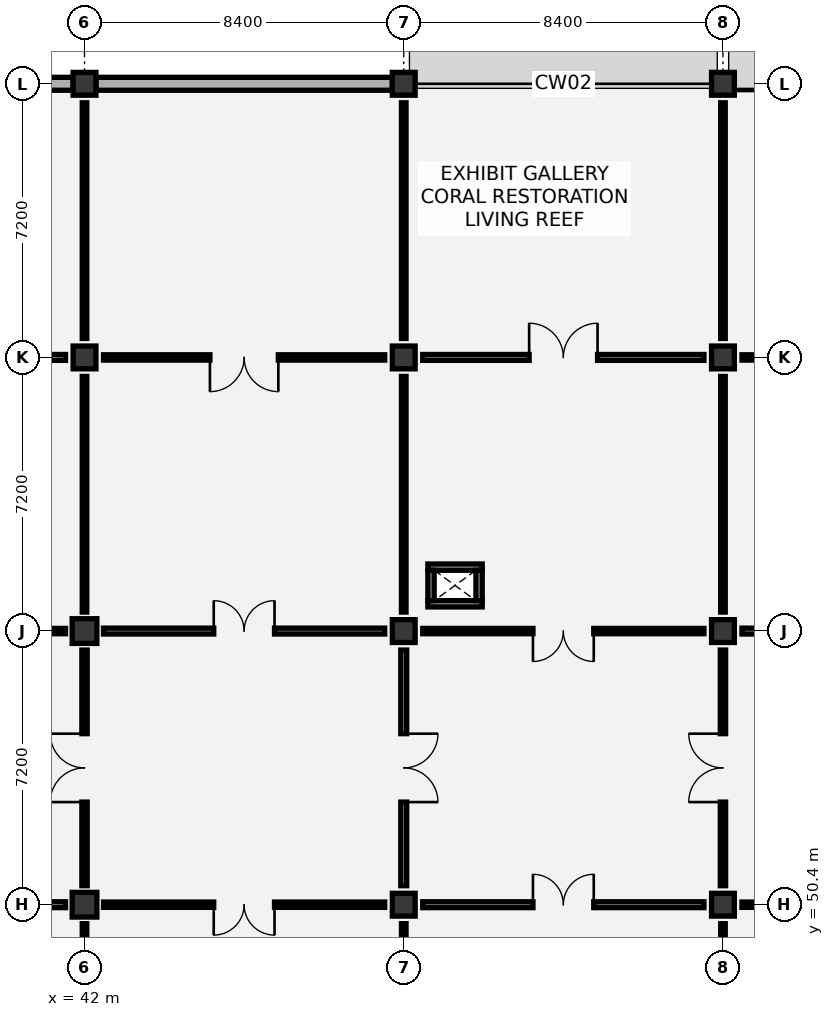
"""IFC4 building model, lengths in metres.
Left out: names, types, materials, properties, quantities, classifications, styles, units other than length and angle.
Written with IfcOpenShell. Run it as: python <this file> out.ifc"""

import sys

from ifc_helpers import new_model, si_unit, direction, frame, frame_2d, origin, origin_2d, place, context, subcontext, project, spatial, rectangle, extrude, element, fill, save


model = new_model("IFC4")
c1 = context("Model", 3, precision=1e-05, world=origin(), true_north=direction((0.0, 1.0)))
c2 = subcontext(c1, "Body", "Model", "MODEL_VIEW")
j1 = project(units=[si_unit("LENGTHUNIT", "METRE"), si_unit("PLANEANGLEUNIT", "RADIAN")], contexts=[c1])
p1 = place(None, origin())
s1 = spatial("IfcSite", under=j1, at=p1, CompositionType="ELEMENT")
p2 = place(p1, origin())
s2 = spatial("IfcBuilding", under=s1, at=p2, CompositionType="ELEMENT")
p3 = place(p2, frame((0.0, 0.0, 11.4)))
s3 = spatial("IfcBuildingStorey", under=s2, at=p3, CompositionType="ELEMENT", Elevation=11.4)
for number, where, z_axis, x_axis in (
    (1, (42.0, 50.4, 0.0), (0.0, 0.0, 1.0), (1.0, 0.0, 0.0)),
    (2, (42.0, 57.6, 0.0), (0.0, 0.0, 1.0), (1.0, 0.0, 0.0)),
):
    element("IfcColumn", number, at=place(p3, frame(where, z_axis=z_axis, x_axis=x_axis)), inside=s3, PredefinedType="COLUMN", context=c2, shape_type="SweptSolid", body=[
        extrude(rectangle(XDim=0.65, YDim=0.65, at=origin_2d()), origin(), (0.0, 0.0, 1.0), 5.4),
    ])
for number, where, z_axis, x_axis in (
    (3, (42.0, 64.8, 0.0), (0.0, 0.0, 1.0), (1.0, 0.0, 0.0)),
    (4, (42.0, 72.0, 0.0), (0.0, 0.0, 1.0), (1.0, 0.0, 0.0)),
    (5, (50.4, 50.4, 0.0), (0.0, 0.0, 1.0), (1.0, 0.0, 0.0)),
    (6, (50.4, 57.6, 0.0), (0.0, 0.0, 1.0), (1.0, 0.0, 0.0)),
    (7, (50.4, 64.8, 0.0), (0.0, 0.0, 1.0), (1.0, 0.0, 0.0)),
    (8, (50.4, 72.0, 0.0), (0.0, 0.0, 1.0), (1.0, 0.0, 0.0)),
    (9, (58.8, 50.4, 0.0), (0.0, 0.0, 1.0), (1.0, 0.0, 0.0)),
    (10, (58.8, 57.6, 0.0), (0.0, 0.0, 1.0), (1.0, 0.0, 0.0)),
    (11, (58.8, 64.8, 0.0), (0.0, 0.0, 1.0), (1.0, 0.0, 0.0)),
    (12, (58.8, 72.0, 0.0), (0.0, 0.0, 1.0), (1.0, 0.0, 0.0)),
):
    element("IfcColumn", number, at=place(p3, frame(where, z_axis=z_axis, x_axis=x_axis)), inside=s3, PredefinedType="COLUMN", context=c2, shape_type="SweptSolid", body=[
        extrude(rectangle(XDim=0.6, YDim=0.6, at=origin_2d()), origin(), (0.0, 0.0, 1.0), 5.4),
    ])
for number, where, z_axis, x_axis in (
    (13, (33.9, 72.0, 0.0), (0.0, 0.0, 1.0), (1.0, 0.0, 0.0)),
    (14, (42.3, 72.0, 0.0), (0.0, 0.0, 1.0), (1.0, 0.0, 0.0)),
):
    element("IfcWall", number, at=place(p3, frame(where, z_axis=z_axis, x_axis=x_axis)), inside=s3, PredefinedType="SOLIDWALL", context=c2, shape_type="SweptSolid", body=[
        extrude(rectangle(XDim=7.8, YDim=0.34, at=frame_2d((3.9, 0.0))), origin(), (0.0, 0.0, 1.0), 4.445),
    ])
p4 = place(p3, frame((59.1, 72.0, 0.0), z_axis=(0.0, 0.0, 1.0), x_axis=(1.0, 0.0, 0.0)))
e15 = element("IfcWall", 15, at=p4, inside=s3, PredefinedType="SOLIDWALL", context=c2, shape_type="SweptSolid", body=[
    extrude(rectangle(XDim=7.7, YDim=0.31, at=frame_2d((3.85, 0.0))), origin(), (0.0, 0.0, 1.0), 4.445),
])
p5 = place(p4, frame((2.425, 0.0, 0.9)))
e16 = element("IfcOpeningElement", 16, at=p5, cuts=e15, PredefinedType="OPENING", context=c2, shape_type="SweptSolid", body=[
    extrude(rectangle(XDim=2.85, YDim=1.95, at=frame_2d((1.425, 0.975))), frame((0.0, 0.165, 0.0), z_axis=(0.0, -1.0, 0.0), x_axis=(1.0, 0.0, 0.0)), (0.0, 0.0, 1.0), 0.33),
])
for number, where, z_axis, x_axis in (
    (17, (51.035, 58.317, 0.0), (0.0, 0.0, 1.0), (1.0, 0.0, 0.0)),
    (18, (51.035, 59.282, 0.0), (0.0, 0.0, 1.0), (1.0, 0.0, 0.0)),
):
    element("IfcWall", number, at=place(p3, frame(where, z_axis=z_axis, x_axis=x_axis)), inside=s3, PredefinedType="PARTITIONING", context=c2, shape_type="SweptSolid", body=[
        extrude(rectangle(XDim=1.43, YDim=0.165, at=frame_2d((0.715, 0.0))), origin(), (0.0, 0.0, 1.0), 5.1),
    ])
for number, where, z_axis, x_axis in (
    (19, (51.117, 58.4, 0.0), (0.0, 0.0, 1.0), (0.0, 1.0, 0.0)),
    (20, (52.383, 58.4, 0.0), (0.0, 0.0, 1.0), (0.0, 1.0, 0.0)),
):
    element("IfcWall", number, at=place(p3, frame(where, z_axis=z_axis, x_axis=x_axis)), inside=s3, PredefinedType="PARTITIONING", context=c2, shape_type="SweptSolid", body=[
        extrude(rectangle(XDim=0.8, YDim=0.165, at=frame_2d((0.4, 0.0))), origin(), (0.0, 0.0, 1.0), 5.1),
    ])
p6 = place(p3, frame((42.0, 43.7, 0.0), z_axis=(0.0, 0.0, 1.0), x_axis=(0.0, 1.0, 0.0)))
e21 = element("IfcWall", 21, at=p6, inside=s3, PredefinedType="PARTITIONING", context=c2, shape_type="SweptSolid", body=[
    extrude(rectangle(XDim=6.2, YDim=0.12, at=frame_2d((3.1, 0.0))), origin(), (0.0, 0.0, 1.0), 4.445),
])
p7 = place(p3, frame((34.1, 50.4, 0.0), z_axis=(0.0, 0.0, 1.0), x_axis=(1.0, 0.0, 0.0)))
e22 = element("IfcWall", 22, at=p7, inside=s3, PredefinedType="PARTITIONING", context=c2, shape_type="SweptSolid", body=[
    extrude(rectangle(XDim=7.4, YDim=0.155, at=frame_2d((3.7, 0.0))), origin(), (0.0, 0.0, 1.0), 5.175),
])
p8 = place(p7, frame((2.9, 0.0, 0.0)))
e23 = element("IfcOpeningElement", 23, at=p8, cuts=e22, PredefinedType="OPENING", context=c2, shape_type="SweptSolid", body=[
    extrude(rectangle(XDim=1.6, YDim=2.2, at=frame_2d((0.8, 1.1))), frame((0.0, 0.087, 0.0), z_axis=(0.0, -1.0, 0.0), x_axis=(1.0, 0.0, 0.0)), (0.0, 0.0, 1.0), 0.175),
])
p9 = place(p3, frame((42.0, 50.9, 0.0), z_axis=(0.0, 0.0, 1.0), x_axis=(0.0, 1.0, 0.0)))
e24 = element("IfcWall", 24, at=p9, inside=s3, PredefinedType="PARTITIONING", context=c2, shape_type="SweptSolid", body=[
    extrude(rectangle(XDim=6.2, YDim=0.14, at=frame_2d((3.1, 0.0))), origin(), (0.0, 0.0, 1.0), 4.445),
])
p10 = place(p9, frame((2.2, 0.0, 0.0)))
e25 = element("IfcOpeningElement", 25, at=p10, cuts=e24, PredefinedType="OPENING", context=c2, shape_type="SweptSolid", body=[
    extrude(rectangle(XDim=1.8, YDim=2.25, at=frame_2d((0.9, 1.125))), frame((0.0, 0.08, 0.0), z_axis=(0.0, -1.0, 0.0), x_axis=(1.0, 0.0, 0.0)), (0.0, 0.0, 1.0), 0.16),
])
p11 = place(p3, frame((34.1, 57.6, 0.0), z_axis=(0.0, 0.0, 1.0), x_axis=(1.0, 0.0, 0.0)))
e26 = element("IfcWall", 26, at=p11, inside=s3, PredefinedType="PARTITIONING", context=c2, shape_type="SweptSolid", body=[
    extrude(rectangle(XDim=7.4, YDim=0.14, at=frame_2d((3.7, 0.0))), origin(), (0.0, 0.0, 1.0), 4.445),
])
p12 = place(p11, frame((2.9, 0.0, 0.0)))
e27 = element("IfcOpeningElement", 27, at=p12, cuts=e26, PredefinedType="OPENING", context=c2, shape_type="SweptSolid", body=[
    extrude(rectangle(XDim=1.6, YDim=2.2, at=frame_2d((0.8, 1.1))), frame((0.0, 0.08, 0.0), z_axis=(0.0, -1.0, 0.0), x_axis=(1.0, 0.0, 0.0)), (0.0, 0.0, 1.0), 0.16),
])
p13 = place(p3, frame((42.0, 58.1, 0.0), z_axis=(0.0, 0.0, 1.0), x_axis=(0.0, 1.0, 0.0)))
e28 = element("IfcWall", 28, at=p13, inside=s3, PredefinedType="PARTITIONING", context=c2, shape_type="SweptSolid", body=[
    extrude(rectangle(XDim=6.2, YDim=0.12, at=frame_2d((3.1, 0.0))), origin(), (0.0, 0.0, 1.0), 4.395),
])
p14 = place(p3, frame((34.1, 64.8, 0.0), z_axis=(0.0, 0.0, 1.0), x_axis=(1.0, 0.0, 0.0)))
e29 = element("IfcWall", 29, at=p14, inside=s3, PredefinedType="PARTITIONING", context=c2, shape_type="SweptSolid", body=[
    extrude(rectangle(XDim=7.4, YDim=0.155, at=frame_2d((3.7, 0.0))), origin(), (0.0, 0.0, 1.0), 4.345),
])
p15 = place(p14, frame((2.8, 0.0, 0.0)))
e30 = element("IfcOpeningElement", 30, at=p15, cuts=e29, PredefinedType="OPENING", context=c2, shape_type="SweptSolid", body=[
    extrude(rectangle(XDim=1.8, YDim=2.25, at=frame_2d((0.9, 1.125))), frame((0.0, 0.087, 0.0), z_axis=(0.0, -1.0, 0.0), x_axis=(1.0, 0.0, 0.0)), (0.0, 0.0, 1.0), 0.175),
])
p16 = place(p3, frame((42.0, 65.3, 0.0), z_axis=(0.0, 0.0, 1.0), x_axis=(0.0, 1.0, 0.0)))
e31 = element("IfcWall", 31, at=p16, inside=s3, PredefinedType="PARTITIONING", context=c2, shape_type="SweptSolid", body=[
    extrude(rectangle(XDim=6.2, YDim=0.12, at=frame_2d((3.1, 0.0))), origin(), (0.0, 0.0, 1.0), 4.595),
])
p17 = place(p3, frame((50.4, 43.7, 0.0), z_axis=(0.0, 0.0, 1.0), x_axis=(0.0, 1.0, 0.0)))
e32 = element("IfcWall", 32, at=p17, inside=s3, PredefinedType="PARTITIONING", context=c2, shape_type="SweptSolid", body=[
    extrude(rectangle(XDim=6.2, YDim=0.12, at=frame_2d((3.1, 0.0))), origin(), (0.0, 0.0, 1.0), 4.805),
])
p18 = place(p3, frame((42.5, 50.4, 0.0), z_axis=(0.0, 0.0, 1.0), x_axis=(1.0, 0.0, 0.0)))
e33 = element("IfcWall", 33, at=p18, inside=s3, PredefinedType="PARTITIONING", context=c2, shape_type="SweptSolid", body=[
    extrude(rectangle(XDim=7.4, YDim=0.14, at=frame_2d((3.7, 0.0))), origin(), (0.0, 0.0, 1.0), 4.345),
])
p19 = place(p18, frame((2.9, 0.0, 0.0)))
e34 = element("IfcOpeningElement", 34, at=p19, cuts=e33, PredefinedType="OPENING", context=c2, shape_type="SweptSolid", body=[
    extrude(rectangle(XDim=1.6, YDim=2.2, at=frame_2d((0.8, 1.1))), frame((0.0, 0.08, 0.0), z_axis=(0.0, -1.0, 0.0), x_axis=(1.0, 0.0, 0.0)), (0.0, 0.0, 1.0), 0.16),
])
p20 = place(p3, frame((50.4, 50.9, 0.0), z_axis=(0.0, 0.0, 1.0), x_axis=(0.0, 1.0, 0.0)))
e35 = element("IfcWall", 35, at=p20, inside=s3, PredefinedType="PARTITIONING", context=c2, shape_type="SweptSolid", body=[
    extrude(rectangle(XDim=6.2, YDim=0.155, at=frame_2d((3.1, 0.0))), origin(), (0.0, 0.0, 1.0), 4.395),
])
p21 = place(p20, frame((2.2, 0.0, 0.0)))
e36 = element("IfcOpeningElement", 36, at=p21, cuts=e35, PredefinedType="OPENING", context=c2, shape_type="SweptSolid", body=[
    extrude(rectangle(XDim=1.8, YDim=2.25, at=frame_2d((0.9, 1.125))), frame((0.0, 0.087, 0.0), z_axis=(0.0, -1.0, 0.0), x_axis=(1.0, 0.0, 0.0)), (0.0, 0.0, 1.0), 0.175),
])
p22 = place(p3, frame((42.5, 57.6, 0.0), z_axis=(0.0, 0.0, 1.0), x_axis=(1.0, 0.0, 0.0)))
e37 = element("IfcWall", 37, at=p22, inside=s3, PredefinedType="PARTITIONING", context=c2, shape_type="SweptSolid", body=[
    extrude(rectangle(XDim=7.4, YDim=0.155, at=frame_2d((3.7, 0.0))), origin(), (0.0, 0.0, 1.0), 4.345),
])
p23 = place(p22, frame((2.9, 0.0, 0.0)))
e38 = element("IfcOpeningElement", 38, at=p23, cuts=e37, PredefinedType="OPENING", context=c2, shape_type="SweptSolid", body=[
    extrude(rectangle(XDim=1.6, YDim=2.2, at=frame_2d((0.8, 1.1))), frame((0.0, 0.087, 0.0), z_axis=(0.0, -1.0, 0.0), x_axis=(1.0, 0.0, 0.0)), (0.0, 0.0, 1.0), 0.175),
])
p24 = place(p3, frame((50.4, 58.1, 0.0), z_axis=(0.0, 0.0, 1.0), x_axis=(0.0, 1.0, 0.0)))
e39 = element("IfcWall", 39, at=p24, inside=s3, PredefinedType="PARTITIONING", context=c2, shape_type="SweptSolid", body=[
    extrude(rectangle(XDim=6.2, YDim=0.12, at=frame_2d((3.1, 0.0))), origin(), (0.0, 0.0, 1.0), 4.595),
])
p25 = place(p3, frame((42.5, 64.8, 0.0), z_axis=(0.0, 0.0, 1.0), x_axis=(1.0, 0.0, 0.0)))
e40 = element("IfcWall", 40, at=p25, inside=s3, PredefinedType="PARTITIONING", context=c2, shape_type="SweptSolid", body=[
    extrude(rectangle(XDim=7.4, YDim=0.14, at=frame_2d((3.7, 0.0))), origin(), (0.0, 0.0, 1.0), 4.345),
])
p26 = place(p25, frame((2.8, 0.0, 0.0)))
e41 = element("IfcOpeningElement", 41, at=p26, cuts=e40, PredefinedType="OPENING", context=c2, shape_type="SweptSolid", body=[
    extrude(rectangle(XDim=1.8, YDim=2.25, at=frame_2d((0.9, 1.125))), frame((0.0, 0.08, 0.0), z_axis=(0.0, -1.0, 0.0), x_axis=(1.0, 0.0, 0.0)), (0.0, 0.0, 1.0), 0.16),
])
for number, where, z_axis, x_axis in (
    (42, (50.4, 65.3, 0.0), (0.0, 0.0, 1.0), (0.0, 1.0, 0.0)),
    (43, (58.8, 43.7, 0.0), (0.0, 0.0, 1.0), (0.0, 1.0, 0.0)),
):
    element("IfcWall", number, at=place(p3, frame(where, z_axis=z_axis, x_axis=x_axis)), inside=s3, PredefinedType="PARTITIONING", context=c2, shape_type="SweptSolid", body=[
        extrude(rectangle(XDim=6.2, YDim=0.12, at=frame_2d((3.1, 0.0))), origin(), (0.0, 0.0, 1.0), 4.395),
    ])
p27 = place(p3, frame((50.9, 50.4, 0.0), z_axis=(0.0, 0.0, 1.0), x_axis=(1.0, 0.0, 0.0)))
e44 = element("IfcWall", 44, at=p27, inside=s3, PredefinedType="PARTITIONING", context=c2, shape_type="SweptSolid", body=[
    extrude(rectangle(XDim=7.4, YDim=0.155, at=frame_2d((3.7, 0.0))), origin(), (0.0, 0.0, 1.0), 4.345),
])
p28 = place(p27, frame((2.9, 0.0, 0.0)))
e45 = element("IfcOpeningElement", 45, at=p28, cuts=e44, PredefinedType="OPENING", context=c2, shape_type="SweptSolid", body=[
    extrude(rectangle(XDim=1.6, YDim=2.2, at=frame_2d((0.8, 1.1))), frame((0.0, 0.087, 0.0), z_axis=(0.0, -1.0, 0.0), x_axis=(1.0, 0.0, 0.0)), (0.0, 0.0, 1.0), 0.175),
])
p29 = place(p3, frame((58.8, 50.9, 0.0), z_axis=(0.0, 0.0, 1.0), x_axis=(0.0, 1.0, 0.0)))
e46 = element("IfcWall", 46, at=p29, inside=s3, PredefinedType="PARTITIONING", context=c2, shape_type="SweptSolid", body=[
    extrude(rectangle(XDim=6.2, YDim=0.14, at=frame_2d((3.1, 0.0))), origin(), (0.0, 0.0, 1.0), 4.595),
])
p30 = place(p29, frame((2.2, 0.0, 0.0)))
e47 = element("IfcOpeningElement", 47, at=p30, cuts=e46, PredefinedType="OPENING", context=c2, shape_type="SweptSolid", body=[
    extrude(rectangle(XDim=1.8, YDim=2.25, at=frame_2d((0.9, 1.125))), frame((0.0, 0.08, 0.0), z_axis=(0.0, -1.0, 0.0), x_axis=(1.0, 0.0, 0.0)), (0.0, 0.0, 1.0), 0.16),
])
p31 = place(p3, frame((50.9, 57.6, 0.0), z_axis=(0.0, 0.0, 1.0), x_axis=(1.0, 0.0, 0.0)))
e48 = element("IfcWall", 48, at=p31, inside=s3, PredefinedType="PARTITIONING", context=c2, shape_type="SweptSolid", body=[
    extrude(rectangle(XDim=7.4, YDim=0.14, at=frame_2d((3.7, 0.0))), origin(), (0.0, 0.0, 1.0), 4.345),
])
p32 = place(p31, frame((2.9, 0.0, 0.0)))
e49 = element("IfcOpeningElement", 49, at=p32, cuts=e48, PredefinedType="OPENING", context=c2, shape_type="SweptSolid", body=[
    extrude(rectangle(XDim=1.6, YDim=2.2, at=frame_2d((0.8, 1.1))), frame((0.0, 0.08, 0.0), z_axis=(0.0, -1.0, 0.0), x_axis=(1.0, 0.0, 0.0)), (0.0, 0.0, 1.0), 0.16),
])
p33 = place(p3, frame((58.8, 58.1, 0.0), z_axis=(0.0, 0.0, 1.0), x_axis=(0.0, 1.0, 0.0)))
e50 = element("IfcWall", 50, at=p33, inside=s3, PredefinedType="PARTITIONING", context=c2, shape_type="SweptSolid", body=[
    extrude(rectangle(XDim=6.2, YDim=0.12, at=frame_2d((3.1, 0.0))), origin(), (0.0, 0.0, 1.0), 4.395),
])
p34 = place(p3, frame((50.9, 64.8, 0.0), z_axis=(0.0, 0.0, 1.0), x_axis=(1.0, 0.0, 0.0)))
e51 = element("IfcWall", 51, at=p34, inside=s3, PredefinedType="PARTITIONING", context=c2, shape_type="SweptSolid", body=[
    extrude(rectangle(XDim=7.4, YDim=0.155, at=frame_2d((3.7, 0.0))), origin(), (0.0, 0.0, 1.0), 4.345),
])
p35 = place(p34, frame((2.8, 0.0, 0.0)))
e52 = element("IfcOpeningElement", 52, at=p35, cuts=e51, PredefinedType="OPENING", context=c2, shape_type="SweptSolid", body=[
    extrude(rectangle(XDim=1.8, YDim=2.25, at=frame_2d((0.9, 1.125))), frame((0.0, 0.087, 0.0), z_axis=(0.0, -1.0, 0.0), x_axis=(1.0, 0.0, 0.0)), (0.0, 0.0, 1.0), 0.175),
])
p36 = place(p3, frame((58.8, 65.3, 0.0), z_axis=(0.0, 0.0, 1.0), x_axis=(0.0, 1.0, 0.0)))
e53 = element("IfcWall", 53, at=p36, inside=s3, PredefinedType="PARTITIONING", context=c2, shape_type="SweptSolid", body=[
    extrude(rectangle(XDim=6.2, YDim=0.12, at=frame_2d((3.1, 0.0))), origin(), (0.0, 0.0, 1.0), 4.695),
])
p37 = place(p3, frame((59.3, 50.4, 0.0), z_axis=(0.0, 0.0, 1.0), x_axis=(1.0, 0.0, 0.0)))
e54 = element("IfcWall", 54, at=p37, inside=s3, PredefinedType="PARTITIONING", context=c2, shape_type="SweptSolid", body=[
    extrude(rectangle(XDim=7.4, YDim=0.14, at=frame_2d((3.7, 0.0))), origin(), (0.0, 0.0, 1.0), 4.345),
])
p38 = place(p37, frame((2.8, 0.0, 0.0)))
e55 = element("IfcOpeningElement", 55, at=p38, cuts=e54, PredefinedType="OPENING", context=c2, shape_type="SweptSolid", body=[
    extrude(rectangle(XDim=1.8, YDim=2.25, at=frame_2d((0.9, 1.125))), frame((0.0, 0.08, 0.0), z_axis=(0.0, -1.0, 0.0), x_axis=(1.0, 0.0, 0.0)), (0.0, 0.0, 1.0), 0.16),
])
p39 = place(p3, frame((59.3, 57.6, 0.0), z_axis=(0.0, 0.0, 1.0), x_axis=(1.0, 0.0, 0.0)))
e56 = element("IfcWall", 56, at=p39, inside=s3, PredefinedType="PARTITIONING", context=c2, shape_type="SweptSolid", body=[
    extrude(rectangle(XDim=7.4, YDim=0.155, at=frame_2d((3.7, 0.0))), origin(), (0.0, 0.0, 1.0), 4.345),
])
p40 = place(p39, frame((2.8, 0.0, 0.0)))
e57 = element("IfcOpeningElement", 57, at=p40, cuts=e56, PredefinedType="OPENING", context=c2, shape_type="SweptSolid", body=[
    extrude(rectangle(XDim=1.8, YDim=2.25, at=frame_2d((0.9, 1.125))), frame((0.0, 0.087, 0.0), z_axis=(0.0, -1.0, 0.0), x_axis=(1.0, 0.0, 0.0)), (0.0, 0.0, 1.0), 0.175),
])
p41 = place(p3, frame((59.3, 64.8, 0.0), z_axis=(0.0, 0.0, 1.0), x_axis=(1.0, 0.0, 0.0)))
e58 = element("IfcWall", 58, at=p41, inside=s3, PredefinedType="PARTITIONING", context=c2, shape_type="SweptSolid", body=[
    extrude(rectangle(XDim=7.4, YDim=0.14, at=frame_2d((3.7, 0.0))), origin(), (0.0, 0.0, 1.0), 4.345),
])
p42 = place(p41, frame((2.9, 0.0, 0.0)))
e59 = element("IfcOpeningElement", 59, at=p42, cuts=e58, PredefinedType="OPENING", context=c2, shape_type="SweptSolid", body=[
    extrude(rectangle(XDim=1.6, YDim=2.2, at=frame_2d((0.8, 1.1))), frame((0.0, 0.08, 0.0), z_axis=(0.0, -1.0, 0.0), x_axis=(1.0, 0.0, 0.0)), (0.0, 0.0, 1.0), 0.16),
])
p43 = place(p10, origin())
e60 = element("IfcDoor", 60, at=p43, inside=s3, OperationType="DOUBLE_DOOR_SINGLE_SWING", PredefinedType="DOOR", context=c2, shape_type="SweptSolid", body=[
    extrude(rectangle(XDim=1.8, YDim=2.25, at=frame_2d((0.9, 1.125))), frame((0.0, 0.025, 0.0), z_axis=(0.0, -1.0, 0.0), x_axis=(1.0, 0.0, 0.0)), (0.0, 0.0, 1.0), 0.05),
])
fill(e25, e60)
p44 = place(p19, frame((1.6, 0.0, 0.0), z_axis=(0.0, 0.0, 1.0), x_axis=(-1.0, 0.0, 0.0)))
e61 = element("IfcDoor", 61, at=p44, inside=s3, OperationType="DOUBLE_DOOR_SINGLE_SWING", PredefinedType="DOOR", context=c2, shape_type="SweptSolid", body=[
    extrude(rectangle(XDim=1.6, YDim=2.2, at=frame_2d((0.8, 1.1))), frame((0.0, 0.025, 0.0), z_axis=(0.0, -1.0, 0.0), x_axis=(1.0, 0.0, 0.0)), (0.0, 0.0, 1.0), 0.05),
])
fill(e34, e61)
p45 = place(p21, frame((1.8, 0.0, 0.0), z_axis=(0.0, 0.0, 1.0), x_axis=(-1.0, 0.0, 0.0)))
e62 = element("IfcDoor", 62, at=p45, inside=s3, OperationType="DOUBLE_DOOR_SINGLE_SWING", PredefinedType="DOOR", context=c2, shape_type="SweptSolid", body=[
    extrude(rectangle(XDim=1.8, YDim=2.25, at=frame_2d((0.9, 1.125))), frame((0.0, 0.025, 0.0), z_axis=(0.0, -1.0, 0.0), x_axis=(1.0, 0.0, 0.0)), (0.0, 0.0, 1.0), 0.05),
])
fill(e36, e62)
p46 = place(p23, origin())
e63 = element("IfcDoor", 63, at=p46, inside=s3, OperationType="DOUBLE_DOOR_SINGLE_SWING", PredefinedType="DOOR", context=c2, shape_type="SweptSolid", body=[
    extrude(rectangle(XDim=1.6, YDim=2.2, at=frame_2d((0.8, 1.1))), frame((0.0, 0.025, 0.0), z_axis=(0.0, -1.0, 0.0), x_axis=(1.0, 0.0, 0.0)), (0.0, 0.0, 1.0), 0.05),
])
fill(e38, e63)
p47 = place(p26, frame((1.8, 0.0, 0.0), z_axis=(0.0, 0.0, 1.0), x_axis=(-1.0, 0.0, 0.0)))
e64 = element("IfcDoor", 64, at=p47, inside=s3, OperationType="DOUBLE_DOOR_SINGLE_SWING", PredefinedType="DOOR", context=c2, shape_type="SweptSolid", body=[
    extrude(rectangle(XDim=1.8, YDim=2.25, at=frame_2d((0.9, 1.125))), frame((0.0, 0.025, 0.0), z_axis=(0.0, -1.0, 0.0), x_axis=(1.0, 0.0, 0.0)), (0.0, 0.0, 1.0), 0.05),
])
fill(e41, e64)
p48 = place(p28, origin())
e65 = element("IfcDoor", 65, at=p48, inside=s3, OperationType="DOUBLE_DOOR_SINGLE_SWING", PredefinedType="DOOR", context=c2, shape_type="SweptSolid", body=[
    extrude(rectangle(XDim=1.6, YDim=2.2, at=frame_2d((0.8, 1.1))), frame((0.0, 0.025, 0.0), z_axis=(0.0, -1.0, 0.0), x_axis=(1.0, 0.0, 0.0)), (0.0, 0.0, 1.0), 0.05),
])
fill(e45, e65)
p49 = place(p30, origin())
e66 = element("IfcDoor", 66, at=p49, inside=s3, OperationType="DOUBLE_DOOR_SINGLE_SWING", PredefinedType="DOOR", context=c2, shape_type="SweptSolid", body=[
    extrude(rectangle(XDim=1.8, YDim=2.25, at=frame_2d((0.9, 1.125))), frame((0.0, 0.025, 0.0), z_axis=(0.0, -1.0, 0.0), x_axis=(1.0, 0.0, 0.0)), (0.0, 0.0, 1.0), 0.05),
])
fill(e47, e66)
p50 = place(p32, frame((1.6, 0.0, 0.0), z_axis=(0.0, 0.0, 1.0), x_axis=(-1.0, 0.0, 0.0)))
e67 = element("IfcDoor", 67, at=p50, inside=s3, OperationType="DOUBLE_DOOR_SINGLE_SWING", PredefinedType="DOOR", context=c2, shape_type="SweptSolid", body=[
    extrude(rectangle(XDim=1.6, YDim=2.2, at=frame_2d((0.8, 1.1))), frame((0.0, 0.025, 0.0), z_axis=(0.0, -1.0, 0.0), x_axis=(1.0, 0.0, 0.0)), (0.0, 0.0, 1.0), 0.05),
])
fill(e49, e67)
p51 = place(p35, origin())
e68 = element("IfcDoor", 68, at=p51, inside=s3, OperationType="DOUBLE_DOOR_SINGLE_SWING", PredefinedType="DOOR", context=c2, shape_type="SweptSolid", body=[
    extrude(rectangle(XDim=1.8, YDim=2.25, at=frame_2d((0.9, 1.125))), frame((0.0, 0.025, 0.0), z_axis=(0.0, -1.0, 0.0), x_axis=(1.0, 0.0, 0.0)), (0.0, 0.0, 1.0), 0.05),
])
fill(e52, e68)
save(model, sys.argv[1])
